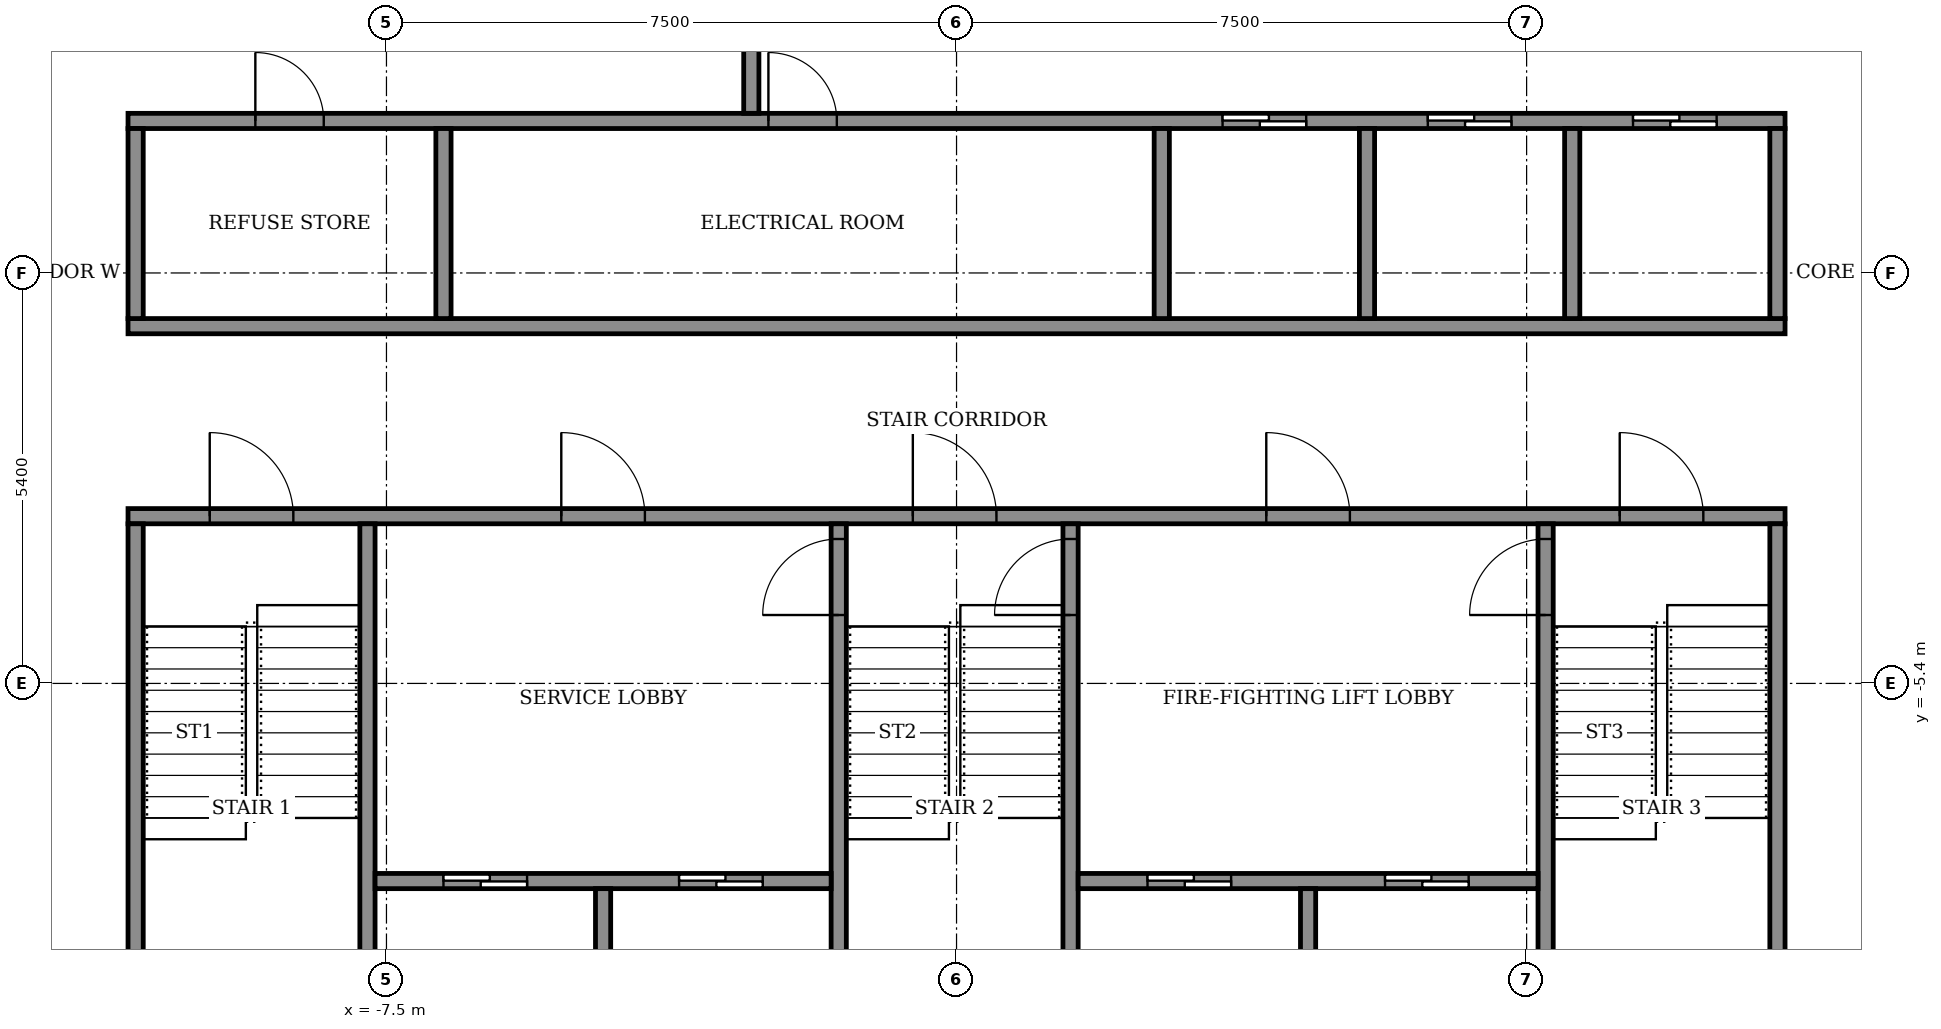
"""IFC4 building model, lengths in metres.
Left out: names, types, materials, properties, quantities, classifications, styles, units other than length and angle.
Written with IfcOpenShell. Run it as: python <this file> out.ifc"""

import sys

from ifc_helpers import new_model, si_unit, direction, frame, frame_2d, origin, place, context, subcontext, project, spatial, rectangle, extrude, element, fill, save


model = new_model("IFC4")
c1 = context("Model", 3, precision=1e-05, world=origin(), true_north=direction((0.0, 1.0)))
c2 = subcontext(c1, "Body", "Model", "MODEL_VIEW")
j1 = project(units=[si_unit("LENGTHUNIT", "METRE"), si_unit("PLANEANGLEUNIT", "RADIAN")], contexts=[c1])
p1 = place(None, origin())
s1 = spatial("IfcSite", under=j1, at=p1, CompositionType="ELEMENT")
p2 = place(p1, origin())
s2 = spatial("IfcBuilding", under=s1, at=p2, CompositionType="ELEMENT")
p3 = place(p2, frame((0.0, 0.0, 205.1)))
s3 = spatial("IfcBuildingStorey", under=s2, at=p3, CompositionType="ELEMENT", Elevation=205.1)
p4 = place(p3, frame((-10.9, -3.2, 0.0), z_axis=(0.0, 0.0, 1.0), x_axis=(1.0, 0.0, 0.0)))
e1 = element("IfcWall", 1, at=p4, inside=s3, PredefinedType="SHEAR", context=c2, shape_type="SweptSolid", body=[
    extrude(rectangle(XDim=21.8, YDim=0.2, at=frame_2d((10.9, 0.0))), origin(), (0.0, 0.0, 1.0), 3.05),
])
p5 = place(p4, frame((1.075, 0.0, 0.0)))
e2 = element("IfcOpeningElement", 2, at=p5, cuts=e1, PredefinedType="OPENING", context=c2, shape_type="SweptSolid", body=[
    extrude(rectangle(XDim=1.1, YDim=2.1, at=frame_2d((0.55, 1.05))), frame((0.0, 0.11, 0.0), z_axis=(0.0, -1.0, 0.0), x_axis=(1.0, 0.0, 0.0)), (0.0, 0.0, 1.0), 0.22),
])
p6 = place(p4, frame((10.325, 0.0, 0.0)))
e3 = element("IfcOpeningElement", 3, at=p6, cuts=e1, PredefinedType="OPENING", context=c2, shape_type="SweptSolid", body=[
    extrude(rectangle(XDim=1.1, YDim=2.1, at=frame_2d((0.55, 1.05))), frame((0.0, 0.11, 0.0), z_axis=(0.0, -1.0, 0.0), x_axis=(1.0, 0.0, 0.0)), (0.0, 0.0, 1.0), 0.22),
])
p7 = place(p4, frame((19.625, 0.0, 0.0)))
e4 = element("IfcOpeningElement", 4, at=p7, cuts=e1, PredefinedType="OPENING", context=c2, shape_type="SweptSolid", body=[
    extrude(rectangle(XDim=1.1, YDim=2.1, at=frame_2d((0.55, 1.05))), frame((0.0, 0.11, 0.0), z_axis=(0.0, -1.0, 0.0), x_axis=(1.0, 0.0, 0.0)), (0.0, 0.0, 1.0), 0.22),
])
p8 = place(p4, frame((5.7, 0.0, 0.0)))
e5 = element("IfcOpeningElement", 5, at=p8, cuts=e1, PredefinedType="OPENING", context=c2, shape_type="SweptSolid", body=[
    extrude(rectangle(XDim=1.1, YDim=2.1, at=frame_2d((0.55, 1.05))), frame((0.0, 0.11, 0.0), z_axis=(0.0, -1.0, 0.0), x_axis=(1.0, 0.0, 0.0)), (0.0, 0.0, 1.0), 0.22),
])
p9 = place(p4, frame((14.975, 0.0, 0.0)))
e6 = element("IfcOpeningElement", 6, at=p9, cuts=e1, PredefinedType="OPENING", context=c2, shape_type="SweptSolid", body=[
    extrude(rectangle(XDim=1.1, YDim=2.1, at=frame_2d((0.55, 1.05))), frame((0.0, 0.11, 0.0), z_axis=(0.0, -1.0, 0.0), x_axis=(1.0, 0.0, 0.0)), (0.0, 0.0, 1.0), 0.22),
])
p10 = place(p3, frame((-10.9, -0.7, 0.0), z_axis=(0.0, 0.0, 1.0), x_axis=(1.0, 0.0, 0.0)))
e7 = element("IfcWall", 7, at=p10, inside=s3, PredefinedType="SHEAR", context=c2, shape_type="SweptSolid", body=[
    extrude(rectangle(XDim=21.8, YDim=0.2, at=frame_2d((10.9, 0.0))), origin(), (0.0, 0.0, 1.0), 3.05),
])
p11 = place(p3, frame((-10.9, 2.0, 0.0), z_axis=(0.0, 0.0, 1.0), x_axis=(1.0, 0.0, 0.0)))
e8 = element("IfcWall", 8, at=p11, inside=s3, PredefinedType="SHEAR", context=c2, shape_type="SweptSolid", body=[
    extrude(rectangle(XDim=21.8, YDim=0.2, at=frame_2d((10.9, 0.0))), origin(), (0.0, 0.0, 1.0), 3.05),
])
p12 = place(p11, frame((14.4, 0.0, 0.0)))
e9 = element("IfcOpeningElement", 9, at=p12, cuts=e8, PredefinedType="OPENING", context=c2, shape_type="SweptSolid", body=[
    extrude(rectangle(XDim=1.1, YDim=2.1, at=frame_2d((0.55, 1.05))), frame((0.0, 0.11, 0.0), z_axis=(0.0, -1.0, 0.0), x_axis=(1.0, 0.0, 0.0)), (0.0, 0.0, 1.0), 0.22),
])
p13 = place(p11, frame((17.1, 0.0, 0.0)))
e10 = element("IfcOpeningElement", 10, at=p13, cuts=e8, PredefinedType="OPENING", context=c2, shape_type="SweptSolid", body=[
    extrude(rectangle(XDim=1.1, YDim=2.1, at=frame_2d((0.55, 1.05))), frame((0.0, 0.11, 0.0), z_axis=(0.0, -1.0, 0.0), x_axis=(1.0, 0.0, 0.0)), (0.0, 0.0, 1.0), 0.22),
])
p14 = place(p11, frame((19.8, 0.0, 0.0)))
e11 = element("IfcOpeningElement", 11, at=p14, cuts=e8, PredefinedType="OPENING", context=c2, shape_type="SweptSolid", body=[
    extrude(rectangle(XDim=1.1, YDim=2.1, at=frame_2d((0.55, 1.05))), frame((0.0, 0.11, 0.0), z_axis=(0.0, -1.0, 0.0), x_axis=(1.0, 0.0, 0.0)), (0.0, 0.0, 1.0), 0.22),
])
p15 = place(p11, frame((1.675, 0.0, 0.0)))
e12 = element("IfcOpeningElement", 12, at=p15, cuts=e8, PredefinedType="OPENING", context=c2, shape_type="SweptSolid", body=[
    extrude(rectangle(XDim=0.9, YDim=2.1, at=frame_2d((0.45, 1.05))), frame((0.0, 0.11, 0.0), z_axis=(0.0, -1.0, 0.0), x_axis=(1.0, 0.0, 0.0)), (0.0, 0.0, 1.0), 0.22),
])
p16 = place(p11, frame((8.425, 0.0, 0.0)))
e13 = element("IfcOpeningElement", 13, at=p16, cuts=e8, PredefinedType="OPENING", context=c2, shape_type="SweptSolid", body=[
    extrude(rectangle(XDim=0.9, YDim=2.1, at=frame_2d((0.45, 1.05))), frame((0.0, 0.11, 0.0), z_axis=(0.0, -1.0, 0.0), x_axis=(1.0, 0.0, 0.0)), (0.0, 0.0, 1.0), 0.22),
])
for number, where, z_axis, x_axis in (
    (14, (-10.8, -10.8, 0.0), (0.0, 0.0, 1.0), (0.0, 1.0, 0.0)),
    (15, (-7.75, -10.8, 0.0), (0.0, 0.0, 1.0), (0.0, 1.0, 0.0)),
):
    element("IfcWall", number, at=place(p3, frame(where, z_axis=z_axis, x_axis=x_axis)), inside=s3, PredefinedType="SHEAR", context=c2, shape_type="SweptSolid", body=[
        extrude(rectangle(XDim=7.5, YDim=0.2, at=frame_2d((3.75, 0.0))), origin(), (0.0, 0.0, 1.0), 3.05),
    ])
p17 = place(p3, frame((-1.55, -10.8, 0.0), z_axis=(0.0, 0.0, 1.0), x_axis=(0.0, 1.0, 0.0)))
e16 = element("IfcWall", 16, at=p17, inside=s3, PredefinedType="SHEAR", context=c2, shape_type="SweptSolid", body=[
    extrude(rectangle(XDim=7.5, YDim=0.2, at=frame_2d((3.75, 0.0))), origin(), (0.0, 0.0, 1.0), 3.05),
])
p18 = place(p17, frame((6.3, 0.0, 0.0)))
e17 = element("IfcOpeningElement", 17, at=p18, cuts=e16, PredefinedType="OPENING", context=c2, shape_type="SweptSolid", body=[
    extrude(rectangle(XDim=1.0, YDim=2.1, at=frame_2d((0.5, 1.05))), frame((0.0, 0.11, 0.0), z_axis=(0.0, -1.0, 0.0), x_axis=(1.0, 0.0, 0.0)), (0.0, 0.0, 1.0), 0.22),
])
p19 = place(p3, frame((1.5, -10.8, 0.0), z_axis=(0.0, 0.0, 1.0), x_axis=(0.0, 1.0, 0.0)))
e18 = element("IfcWall", 18, at=p19, inside=s3, PredefinedType="SHEAR", context=c2, shape_type="SweptSolid", body=[
    extrude(rectangle(XDim=7.5, YDim=0.2, at=frame_2d((3.75, 0.0))), origin(), (0.0, 0.0, 1.0), 3.05),
])
p20 = place(p19, frame((6.3, 0.0, 0.0)))
e19 = element("IfcOpeningElement", 19, at=p20, cuts=e18, PredefinedType="OPENING", context=c2, shape_type="SweptSolid", body=[
    extrude(rectangle(XDim=1.0, YDim=2.1, at=frame_2d((0.5, 1.05))), frame((0.0, 0.11, 0.0), z_axis=(0.0, -1.0, 0.0), x_axis=(1.0, 0.0, 0.0)), (0.0, 0.0, 1.0), 0.22),
])
p21 = place(p3, frame((7.75, -10.8, 0.0), z_axis=(0.0, 0.0, 1.0), x_axis=(0.0, 1.0, 0.0)))
e20 = element("IfcWall", 20, at=p21, inside=s3, PredefinedType="SHEAR", context=c2, shape_type="SweptSolid", body=[
    extrude(rectangle(XDim=7.5, YDim=0.2, at=frame_2d((3.75, 0.0))), origin(), (0.0, 0.0, 1.0), 3.05),
])
p22 = place(p21, frame((6.3, 0.0, 0.0)))
e21 = element("IfcOpeningElement", 21, at=p22, cuts=e20, PredefinedType="OPENING", context=c2, shape_type="SweptSolid", body=[
    extrude(rectangle(XDim=1.0, YDim=2.1, at=frame_2d((0.5, 1.05))), frame((0.0, 0.11, 0.0), z_axis=(0.0, -1.0, 0.0), x_axis=(1.0, 0.0, 0.0)), (0.0, 0.0, 1.0), 0.22),
])
p23 = place(p3, frame((10.8, -10.8, 0.0), z_axis=(0.0, 0.0, 1.0), x_axis=(0.0, 1.0, 0.0)))
e22 = element("IfcWall", 22, at=p23, inside=s3, PredefinedType="SHEAR", context=c2, shape_type="SweptSolid", body=[
    extrude(rectangle(XDim=7.5, YDim=0.2, at=frame_2d((3.75, 0.0))), origin(), (0.0, 0.0, 1.0), 3.05),
])
p24 = place(p3, frame((-7.65, -8.0, 0.0), z_axis=(0.0, 0.0, 1.0), x_axis=(1.0, 0.0, 0.0)))
e23 = element("IfcWall", 23, at=p24, inside=s3, PredefinedType="SHEAR", context=c2, shape_type="SweptSolid", body=[
    extrude(rectangle(XDim=6.0, YDim=0.2, at=frame_2d((3.0, 0.0))), origin(), (0.0, 0.0, 1.0), 3.05),
])
p25 = place(p24, frame((0.9, 0.0, 0.0)))
e24 = element("IfcOpeningElement", 24, at=p25, cuts=e23, PredefinedType="OPENING", context=c2, shape_type="SweptSolid", body=[
    extrude(rectangle(XDim=1.1, YDim=2.1, at=frame_2d((0.55, 1.05))), frame((0.0, 0.11, 0.0), z_axis=(0.0, -1.0, 0.0), x_axis=(1.0, 0.0, 0.0)), (0.0, 0.0, 1.0), 0.22),
])
p26 = place(p24, frame((4.0, 0.0, 0.0)))
e25 = element("IfcOpeningElement", 25, at=p26, cuts=e23, PredefinedType="OPENING", context=c2, shape_type="SweptSolid", body=[
    extrude(rectangle(XDim=1.1, YDim=2.1, at=frame_2d((0.55, 1.05))), frame((0.0, 0.11, 0.0), z_axis=(0.0, -1.0, 0.0), x_axis=(1.0, 0.0, 0.0)), (0.0, 0.0, 1.0), 0.22),
])
p27 = place(p3, frame((-4.65, -10.8, 0.0), z_axis=(0.0, 0.0, 1.0), x_axis=(0.0, 1.0, 0.0)))
e26 = element("IfcWall", 26, at=p27, inside=s3, PredefinedType="SHEAR", context=c2, shape_type="SweptSolid", body=[
    extrude(rectangle(XDim=2.7, YDim=0.2, at=frame_2d((1.35, 0.0))), origin(), (0.0, 0.0, 1.0), 3.05),
])
p28 = place(p3, frame((1.6, -8.0, 0.0), z_axis=(0.0, 0.0, 1.0), x_axis=(1.0, 0.0, 0.0)))
e27 = element("IfcWall", 27, at=p28, inside=s3, PredefinedType="SHEAR", context=c2, shape_type="SweptSolid", body=[
    extrude(rectangle(XDim=6.05, YDim=0.2, at=frame_2d((3.025, 0.0))), origin(), (0.0, 0.0, 1.0), 3.05),
])
p29 = place(p28, frame((0.913, 0.0, 0.0)))
e28 = element("IfcOpeningElement", 28, at=p29, cuts=e27, PredefinedType="OPENING", context=c2, shape_type="SweptSolid", body=[
    extrude(rectangle(XDim=1.1, YDim=2.1, at=frame_2d((0.55, 1.05))), frame((0.0, 0.11, 0.0), z_axis=(0.0, -1.0, 0.0), x_axis=(1.0, 0.0, 0.0)), (0.0, 0.0, 1.0), 0.22),
])
p30 = place(p28, frame((4.038, 0.0, 0.0)))
e29 = element("IfcOpeningElement", 29, at=p30, cuts=e27, PredefinedType="OPENING", context=c2, shape_type="SweptSolid", body=[
    extrude(rectangle(XDim=1.1, YDim=2.1, at=frame_2d((0.55, 1.05))), frame((0.0, 0.11, 0.0), z_axis=(0.0, -1.0, 0.0), x_axis=(1.0, 0.0, 0.0)), (0.0, 0.0, 1.0), 0.22),
])
p31 = place(p3, frame((4.625, -10.8, 0.0), z_axis=(0.0, 0.0, 1.0), x_axis=(0.0, 1.0, 0.0)))
e30 = element("IfcWall", 30, at=p31, inside=s3, PredefinedType="SHEAR", context=c2, shape_type="SweptSolid", body=[
    extrude(rectangle(XDim=2.7, YDim=0.2, at=frame_2d((1.35, 0.0))), origin(), (0.0, 0.0, 1.0), 3.05),
])
for number, where, z_axis, x_axis in (
    (31, (-10.8, -0.6, 0.0), (0.0, 0.0, 1.0), (0.0, 1.0, 0.0)),
    (32, (-6.75, -0.6, 0.0), (0.0, 0.0, 1.0), (0.0, 1.0, 0.0)),
):
    element("IfcWall", number, at=place(p3, frame(where, z_axis=z_axis, x_axis=x_axis)), inside=s3, PredefinedType="STANDARD", context=c2, shape_type="SweptSolid", body=[
        extrude(rectangle(XDim=2.5, YDim=0.2, at=frame_2d((1.25, 0.0))), origin(), (0.0, 0.0, 1.0), 3.05),
    ])
for number, where, z_axis, x_axis in (
    (33, (2.7, -0.6, 0.0), (0.0, 0.0, 1.0), (0.0, 1.0, 0.0)),
    (34, (5.4, -0.6, 0.0), (0.0, 0.0, 1.0), (0.0, 1.0, 0.0)),
    (35, (8.1, -0.6, 0.0), (0.0, 0.0, 1.0), (0.0, 1.0, 0.0)),
    (36, (10.8, -0.6, 0.0), (0.0, 0.0, 1.0), (0.0, 1.0, 0.0)),
):
    element("IfcWall", number, at=place(p3, frame(where, z_axis=z_axis, x_axis=x_axis)), inside=s3, PredefinedType="SHEAR", context=c2, shape_type="SweptSolid", body=[
        extrude(rectangle(XDim=2.5, YDim=0.2, at=frame_2d((1.25, 0.0))), origin(), (0.0, 0.0, 1.0), 3.05),
    ])
p32 = place(p3, frame((-2.7, 2.1, 0.0), z_axis=(0.0, 0.0, 1.0), x_axis=(0.0, 1.0, 0.0)))
e37 = element("IfcWall", 37, at=p32, inside=s3, PredefinedType="STANDARD", context=c2, shape_type="SweptSolid", body=[
    extrude(rectangle(XDim=5.9, YDim=0.2, at=frame_2d((2.95, 0.0))), origin(), (0.0, 0.0, 1.0), 3.05),
])
p33 = place(p32, frame((2.35, 0.0, 0.0)))
e38 = element("IfcOpeningElement", 38, at=p33, cuts=e37, PredefinedType="OPENING", context=c2, shape_type="SweptSolid", body=[
    extrude(rectangle(XDim=1.2, YDim=2.1, at=frame_2d((0.6, 1.05))), frame((0.0, 0.11, 0.0), z_axis=(0.0, -1.0, 0.0), x_axis=(1.0, 0.0, 0.0)), (0.0, 0.0, 1.0), 0.22),
])
p34 = place(p12, origin())
e39 = element("IfcDoor", 39, at=p34, inside=s3, OperationType="SLIDING_TO_LEFT", PredefinedType="DOOR", context=c2, shape_type="SweptSolid", body=[
    extrude(rectangle(XDim=1.1, YDim=2.1, at=frame_2d((0.55, 1.05))), frame((0.0, 0.025, 0.0), z_axis=(0.0, -1.0, 0.0), x_axis=(1.0, 0.0, 0.0)), (0.0, 0.0, 1.0), 0.05),
])
fill(e9, e39)
p35 = place(p13, origin())
e40 = element("IfcDoor", 40, at=p35, inside=s3, OperationType="SLIDING_TO_LEFT", PredefinedType="DOOR", context=c2, shape_type="SweptSolid", body=[
    extrude(rectangle(XDim=1.1, YDim=2.1, at=frame_2d((0.55, 1.05))), frame((0.0, 0.025, 0.0), z_axis=(0.0, -1.0, 0.0), x_axis=(1.0, 0.0, 0.0)), (0.0, 0.0, 1.0), 0.05),
])
fill(e10, e40)
p36 = place(p14, origin())
e41 = element("IfcDoor", 41, at=p36, inside=s3, OperationType="SLIDING_TO_LEFT", PredefinedType="DOOR", context=c2, shape_type="SweptSolid", body=[
    extrude(rectangle(XDim=1.1, YDim=2.1, at=frame_2d((0.55, 1.05))), frame((0.0, 0.025, 0.0), z_axis=(0.0, -1.0, 0.0), x_axis=(1.0, 0.0, 0.0)), (0.0, 0.0, 1.0), 0.05),
])
fill(e11, e41)
p37 = place(p15, origin())
e42 = element("IfcDoor", 42, at=p37, inside=s3, OperationType="SINGLE_SWING_RIGHT", PredefinedType="DOOR", context=c2, shape_type="SweptSolid", body=[
    extrude(rectangle(XDim=0.9, YDim=2.1, at=frame_2d((0.45, 1.05))), frame((0.0, 0.025, 0.0), z_axis=(0.0, -1.0, 0.0), x_axis=(1.0, 0.0, 0.0)), (0.0, 0.0, 1.0), 0.05),
])
fill(e12, e42)
p38 = place(p16, origin())
e43 = element("IfcDoor", 43, at=p38, inside=s3, OperationType="SINGLE_SWING_LEFT", PredefinedType="DOOR", context=c2, shape_type="SweptSolid", body=[
    extrude(rectangle(XDim=0.9, YDim=2.1, at=frame_2d((0.45, 1.05))), frame((0.0, 0.025, 0.0), z_axis=(0.0, -1.0, 0.0), x_axis=(1.0, 0.0, 0.0)), (0.0, 0.0, 1.0), 0.05),
])
fill(e13, e43)
p39 = place(p29, origin())
e44 = element("IfcDoor", 44, at=p39, inside=s3, OperationType="SLIDING_TO_LEFT", PredefinedType="DOOR", context=c2, shape_type="SweptSolid", body=[
    extrude(rectangle(XDim=1.1, YDim=2.1, at=frame_2d((0.55, 1.05))), frame((0.0, 0.025, 0.0), z_axis=(0.0, -1.0, 0.0), x_axis=(1.0, 0.0, 0.0)), (0.0, 0.0, 1.0), 0.05),
])
fill(e28, e44)
p40 = place(p25, origin())
e45 = element("IfcDoor", 45, at=p40, inside=s3, OperationType="SLIDING_TO_LEFT", PredefinedType="DOOR", context=c2, shape_type="SweptSolid", body=[
    extrude(rectangle(XDim=1.1, YDim=2.1, at=frame_2d((0.55, 1.05))), frame((0.0, 0.025, 0.0), z_axis=(0.0, -1.0, 0.0), x_axis=(1.0, 0.0, 0.0)), (0.0, 0.0, 1.0), 0.05),
])
fill(e24, e45)
p41 = place(p30, origin())
e46 = element("IfcDoor", 46, at=p41, inside=s3, OperationType="SLIDING_TO_LEFT", PredefinedType="DOOR", context=c2, shape_type="SweptSolid", body=[
    extrude(rectangle(XDim=1.1, YDim=2.1, at=frame_2d((0.55, 1.05))), frame((0.0, 0.025, 0.0), z_axis=(0.0, -1.0, 0.0), x_axis=(1.0, 0.0, 0.0)), (0.0, 0.0, 1.0), 0.05),
])
fill(e29, e46)
p42 = place(p26, origin())
e47 = element("IfcDoor", 47, at=p42, inside=s3, OperationType="SLIDING_TO_LEFT", PredefinedType="DOOR", context=c2, shape_type="SweptSolid", body=[
    extrude(rectangle(XDim=1.1, YDim=2.1, at=frame_2d((0.55, 1.05))), frame((0.0, 0.025, 0.0), z_axis=(0.0, -1.0, 0.0), x_axis=(1.0, 0.0, 0.0)), (0.0, 0.0, 1.0), 0.05),
])
fill(e25, e47)
p43 = place(p5, origin())
e48 = element("IfcDoor", 48, at=p43, inside=s3, OperationType="SINGLE_SWING_RIGHT", PredefinedType="DOOR", context=c2, shape_type="SweptSolid", body=[
    extrude(rectangle(XDim=1.1, YDim=2.1, at=frame_2d((0.55, 1.05))), frame((0.0, 0.025, 0.0), z_axis=(0.0, -1.0, 0.0), x_axis=(1.0, 0.0, 0.0)), (0.0, 0.0, 1.0), 0.05),
])
fill(e2, e48)
p44 = place(p6, origin())
e49 = element("IfcDoor", 49, at=p44, inside=s3, OperationType="SINGLE_SWING_RIGHT", PredefinedType="DOOR", context=c2, shape_type="SweptSolid", body=[
    extrude(rectangle(XDim=1.1, YDim=2.1, at=frame_2d((0.55, 1.05))), frame((0.0, 0.025, 0.0), z_axis=(0.0, -1.0, 0.0), x_axis=(1.0, 0.0, 0.0)), (0.0, 0.0, 1.0), 0.05),
])
fill(e3, e49)
p45 = place(p7, origin())
e50 = element("IfcDoor", 50, at=p45, inside=s3, OperationType="SINGLE_SWING_RIGHT", PredefinedType="DOOR", context=c2, shape_type="SweptSolid", body=[
    extrude(rectangle(XDim=1.1, YDim=2.1, at=frame_2d((0.55, 1.05))), frame((0.0, 0.025, 0.0), z_axis=(0.0, -1.0, 0.0), x_axis=(1.0, 0.0, 0.0)), (0.0, 0.0, 1.0), 0.05),
])
fill(e4, e50)
p46 = place(p8, origin())
e51 = element("IfcDoor", 51, at=p46, inside=s3, OperationType="SINGLE_SWING_LEFT", PredefinedType="DOOR", context=c2, shape_type="SweptSolid", body=[
    extrude(rectangle(XDim=1.1, YDim=2.1, at=frame_2d((0.55, 1.05))), frame((0.0, 0.025, 0.0), z_axis=(0.0, -1.0, 0.0), x_axis=(1.0, 0.0, 0.0)), (0.0, 0.0, 1.0), 0.05),
])
fill(e5, e51)
p47 = place(p9, origin())
e52 = element("IfcDoor", 52, at=p47, inside=s3, OperationType="SINGLE_SWING_LEFT", PredefinedType="DOOR", context=c2, shape_type="SweptSolid", body=[
    extrude(rectangle(XDim=1.1, YDim=2.1, at=frame_2d((0.55, 1.05))), frame((0.0, 0.025, 0.0), z_axis=(0.0, -1.0, 0.0), x_axis=(1.0, 0.0, 0.0)), (0.0, 0.0, 1.0), 0.05),
])
fill(e6, e52)
p48 = place(p18, origin())
e53 = element("IfcDoor", 53, at=p48, inside=s3, OperationType="SINGLE_SWING_RIGHT", PredefinedType="DOOR", context=c2, shape_type="SweptSolid", body=[
    extrude(rectangle(XDim=1.0, YDim=2.1, at=frame_2d((0.5, 1.05))), frame((0.0, 0.025, 0.0), z_axis=(0.0, -1.0, 0.0), x_axis=(1.0, 0.0, 0.0)), (0.0, 0.0, 1.0), 0.05),
])
fill(e17, e53)
p49 = place(p20, origin())
e54 = element("IfcDoor", 54, at=p49, inside=s3, OperationType="SINGLE_SWING_RIGHT", PredefinedType="DOOR", context=c2, shape_type="SweptSolid", body=[
    extrude(rectangle(XDim=1.0, YDim=2.1, at=frame_2d((0.5, 1.05))), frame((0.0, 0.025, 0.0), z_axis=(0.0, -1.0, 0.0), x_axis=(1.0, 0.0, 0.0)), (0.0, 0.0, 1.0), 0.05),
])
fill(e19, e54)
p50 = place(p22, origin())
e55 = element("IfcDoor", 55, at=p50, inside=s3, OperationType="SINGLE_SWING_RIGHT", PredefinedType="DOOR", context=c2, shape_type="SweptSolid", body=[
    extrude(rectangle(XDim=1.0, YDim=2.1, at=frame_2d((0.5, 1.05))), frame((0.0, 0.025, 0.0), z_axis=(0.0, -1.0, 0.0), x_axis=(1.0, 0.0, 0.0)), (0.0, 0.0, 1.0), 0.05),
])
fill(e21, e55)
save(model, sys.argv[1])
